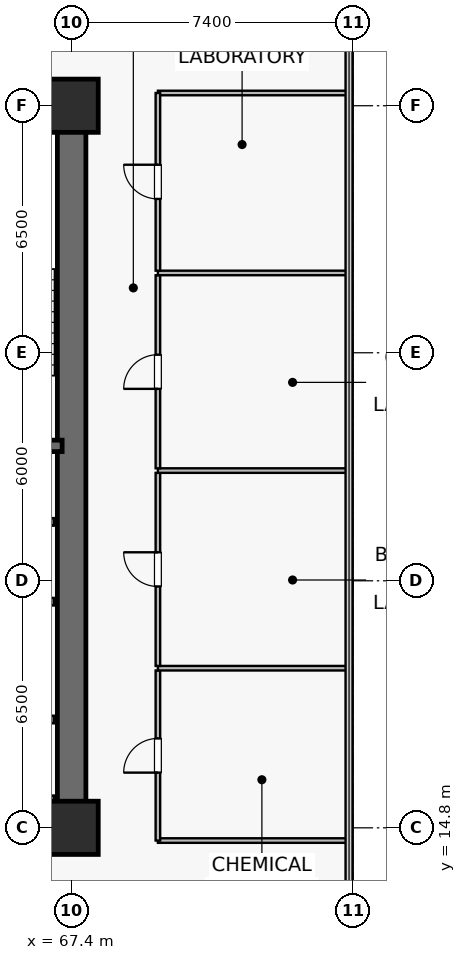
"""IFC4 building model, lengths in metres.
Left out: names, types, materials, properties, quantities, classifications, styles, units other than length and angle.
Written with IfcOpenShell. Run it as: python <this file> out.ifc"""

import sys

from ifc_helpers import new_model, si_unit, direction, frame, frame_2d, origin, origin_2d, place, context, subcontext, project, spatial, rectangle, extrude, source, transform, mapped, element, fill, save


model = new_model("IFC4")
c1 = context("Model", 3, precision=1e-05, world=origin(), true_north=direction((0.0, 1.0)))
c2 = subcontext(c1, "Body", "Model", "MODEL_VIEW")
j1 = project(units=[si_unit("LENGTHUNIT", "METRE"), si_unit("PLANEANGLEUNIT", "RADIAN")], contexts=[c1])
p1 = place(None, origin())
s1 = spatial("IfcSite", under=j1, at=p1, CompositionType="ELEMENT")
p2 = place(p1, origin())
s2 = spatial("IfcBuilding", under=s1, at=p2, CompositionType="ELEMENT")
p3 = place(p2, frame((0.0, 0.0, 58.0)))
s3 = spatial("IfcBuildingStorey", under=s2, at=p3, CompositionType="ELEMENT", Elevation=58.0)
p4 = place(p3, frame((52.225, 14.8, 0.0), z_axis=(0.0, 0.0, 1.0), x_axis=(1.0, 0.0, 0.0)))
e1 = element("IfcWall", 1, at=p4, inside=s3, PredefinedType="SHEAR", context=c2, shape_type="SweptSolid", body=[
    extrude(rectangle(XDim=15.55, YDim=0.75, at=frame_2d((7.775, 0.0))), origin(), (0.0, 0.0, 1.0), 3.78),
])
p5 = place(p3, frame((52.225, 33.8, 0.0), z_axis=(0.0, 0.0, 1.0), x_axis=(1.0, 0.0, 0.0)))
e2 = element("IfcWall", 2, at=p5, inside=s3, PredefinedType="SHEAR", context=c2, shape_type="SweptSolid", body=[
    extrude(rectangle(XDim=15.55, YDim=0.75, at=frame_2d((7.775, 0.0))), origin(), (0.0, 0.0, 1.0), 3.78),
])
p6 = place(p5, frame((7.725, 0.0, 0.0)))
e3 = element("IfcOpeningElement", 3, at=p6, cuts=e2, PredefinedType="OPENING", context=c2, shape_type="SweptSolid", body=[
    extrude(rectangle(XDim=0.95, YDim=2.15, at=frame_2d((0.475, 1.075))), frame((0.0, 0.385, 0.0), z_axis=(0.0, -1.0, 0.0), x_axis=(1.0, 0.0, 0.0)), (0.0, 0.0, 1.0), 0.77),
])
p7 = place(p5, frame((2.66, 0.0, 0.0)))
e4 = element("IfcOpeningElement", 4, at=p7, cuts=e2, PredefinedType="OPENING", context=c2, shape_type="SweptSolid", body=[
    extrude(rectangle(XDim=0.95, YDim=2.15, at=frame_2d((0.475, 1.075))), frame((0.0, 0.385, 0.0), z_axis=(0.0, -1.0, 0.0), x_axis=(1.0, 0.0, 0.0)), (0.0, 0.0, 1.0), 0.77),
])
p8 = place(p3, frame((67.4, 15.175, 0.0), z_axis=(0.0, 0.0, 1.0), x_axis=(0.0, 1.0, 0.0)))
e5 = element("IfcWall", 5, at=p8, inside=s3, PredefinedType="SHEAR", context=c2, shape_type="SweptSolid", body=[
    extrude(rectangle(XDim=18.25, YDim=0.75, at=frame_2d((9.125, 0.0))), origin(), (0.0, 0.0, 1.0), 3.78),
])
p9 = place(p3, frame((63.35, 24.85, 0.0), z_axis=(0.0, 0.0, 1.0), x_axis=(1.0, 0.0, 0.0)))
e6 = element("IfcWall", 6, at=p9, inside=s3, PredefinedType="SHEAR", context=c2, shape_type="SweptSolid", body=[
    extrude(rectangle(XDim=3.8, YDim=0.3, at=frame_2d((1.9, 0.0))), origin(), (0.0, 0.0, 1.0), 3.78),
])
p10 = place(p3, frame((63.35, 33.4, 0.0), z_axis=(0.0, 0.0, 1.0), x_axis=(1.0, 0.0, 0.0)))
e7 = element("IfcWall", 7, at=p10, inside=s3, PredefinedType="SOLIDWALL", context=c2, shape_type="SweptSolid", body=[
    extrude(rectangle(XDim=3.72, YDim=0.12, at=frame_2d((1.86, 0.0))), origin(), (0.0, 0.0, 1.0), 3.78),
])
m1 = source(origin(), c2, "Body", "SweptSolid", [
    extrude(rectangle(XDim=1.4, YDim=1.4, at=origin_2d()), origin(), (0.0, 0.0, 1.0), 4.1),
])
for number, where, z_axis, x_axis in (
    (8, (67.4, 14.8, 0.0), (0.0, 0.0, 1.0), (1.0, 0.0, 0.0)),
    (9, (67.4, 33.8, 0.0), (0.0, 0.0, 1.0), (1.0, 0.0, 0.0)),
):
    element("IfcColumn", number, at=place(p3, frame(where, z_axis=z_axis, x_axis=x_axis)), inside=s3, PredefinedType="COLUMN", context=c2, shape_type="MappedRepresentation", body=[
        mapped(m1, transform((0.0, 0.0, 0.0), scale=1.0)),
    ])
p11 = place(p3, frame((64.67, 17.65, 0.0), z_axis=(0.0, 0.0, 1.0), x_axis=(1.0, 0.0, 0.0)))
e10 = element("IfcWall", 10, at=p11, inside=s3, PredefinedType="SOLIDWALL", context=c2, shape_type="SweptSolid", body=[
    extrude(rectangle(XDim=2.26, YDim=0.2, at=frame_2d((1.13, 0.0))), origin(), (0.0, 0.0, 1.0), 3.78),
])
p12 = place(p11, frame((0.58, 0.0, 0.0)))
e11 = element("IfcOpeningElement", 11, at=p12, cuts=e10, PredefinedType="OPENING", context=c2, shape_type="SweptSolid", body=[
    extrude(rectangle(XDim=1.1, YDim=2.22, at=frame_2d((0.55, 1.11))), frame((0.0, 0.11, 0.0), z_axis=(0.0, -1.0, 0.0), x_axis=(1.0, 0.0, 0.0)), (0.0, 0.0, 1.0), 0.22),
])
for number, where, z_axis, x_axis in (
    (12, (64.67, 15.55, 0.0), (0.0, 0.0, 1.0), (1.0, 0.0, 0.0)),
    (13, (64.67, 20.75, 0.0), (0.0, 0.0, 1.0), (1.0, 0.0, 0.0)),
    (14, (64.67, 22.85, 0.0), (0.0, 0.0, 1.0), (1.0, 0.0, 0.0)),
):
    element("IfcWall", number, at=place(p3, frame(where, z_axis=z_axis, x_axis=x_axis)), inside=s3, PredefinedType="SOLIDWALL", context=c2, shape_type="SweptSolid", body=[
        extrude(rectangle(XDim=2.26, YDim=0.2, at=frame_2d((1.13, 0.0))), origin(), (0.0, 0.0, 1.0), 3.78),
    ])
for number, where, z_axis, x_axis in (
    (15, (69.67, 14.465, 0.0), (0.0, 0.0, 1.0), (1.0, 0.0, 0.0)),
    (16, (69.67, 34.135, 0.0), (0.0, 0.0, 1.0), (1.0, 0.0, 0.0)),
):
    element("IfcWall", number, at=place(p3, frame(where, z_axis=z_axis, x_axis=x_axis)), inside=s3, PredefinedType="PARTITIONING", context=c2, shape_type="SweptSolid", body=[
        extrude(rectangle(XDim=5.02, YDim=0.12, at=frame_2d((2.51, 0.0))), origin(), (0.0, 0.0, 1.0), 3.78),
    ])
p13 = place(p3, frame((69.67, 14.465, 0.0), z_axis=(0.0, 0.0, 1.0), x_axis=(0.0, 1.0, 0.0)))
e17 = element("IfcWall", 17, at=p13, inside=s3, PredefinedType="PARTITIONING", context=c2, shape_type="SweptSolid", body=[
    extrude(rectangle(XDim=4.475, YDim=0.12, at=frame_2d((2.237, 0.0))), origin(), (0.0, 0.0, 1.0), 3.78),
])
p14 = place(p13, frame((1.788, 0.0, 0.0)))
e18 = element("IfcOpeningElement", 18, at=p14, cuts=e17, PredefinedType="OPENING", context=c2, shape_type="SweptSolid", body=[
    extrude(rectangle(XDim=0.9, YDim=2.1, at=frame_2d((0.45, 1.05))), frame((0.0, 0.07, 0.0), z_axis=(0.0, -1.0, 0.0), x_axis=(1.0, 0.0, 0.0)), (0.0, 0.0, 1.0), 0.14),
])
p15 = place(p3, frame((69.67, 19.0, 0.0), z_axis=(0.0, 0.0, 1.0), x_axis=(1.0, 0.0, 0.0)))
e19 = element("IfcWall", 19, at=p15, inside=s3, PredefinedType="PARTITIONING", context=c2, shape_type="SweptSolid", body=[
    extrude(rectangle(XDim=5.02, YDim=0.12, at=frame_2d((2.51, 0.0))), origin(), (0.0, 0.0, 1.0), 3.78),
])
p16 = place(p3, frame((69.67, 19.06, 0.0), z_axis=(0.0, 0.0, 1.0), x_axis=(0.0, 1.0, 0.0)))
e20 = element("IfcWall", 20, at=p16, inside=s3, PredefinedType="PARTITIONING", context=c2, shape_type="SweptSolid", body=[
    extrude(rectangle(XDim=5.08, YDim=0.12, at=frame_2d((2.54, 0.0))), origin(), (0.0, 0.0, 1.0), 3.78),
])
p17 = place(p16, frame((2.09, 0.0, 0.0)))
e21 = element("IfcOpeningElement", 21, at=p17, cuts=e20, PredefinedType="OPENING", context=c2, shape_type="SweptSolid", body=[
    extrude(rectangle(XDim=0.9, YDim=2.1, at=frame_2d((0.45, 1.05))), frame((0.0, 0.07, 0.0), z_axis=(0.0, -1.0, 0.0), x_axis=(1.0, 0.0, 0.0)), (0.0, 0.0, 1.0), 0.14),
])
p18 = place(p3, frame((69.67, 24.2, 0.0), z_axis=(0.0, 0.0, 1.0), x_axis=(1.0, 0.0, 0.0)))
e22 = element("IfcWall", 22, at=p18, inside=s3, PredefinedType="PARTITIONING", context=c2, shape_type="SweptSolid", body=[
    extrude(rectangle(XDim=5.02, YDim=0.12, at=frame_2d((2.51, 0.0))), origin(), (0.0, 0.0, 1.0), 3.78),
])
p19 = place(p3, frame((69.67, 24.26, 0.0), z_axis=(0.0, 0.0, 1.0), x_axis=(0.0, 1.0, 0.0)))
e23 = element("IfcWall", 23, at=p19, inside=s3, PredefinedType="PARTITIONING", context=c2, shape_type="SweptSolid", body=[
    extrude(rectangle(XDim=5.08, YDim=0.12, at=frame_2d((2.54, 0.0))), origin(), (0.0, 0.0, 1.0), 3.78),
])
p20 = place(p19, frame((2.09, 0.0, 0.0)))
e24 = element("IfcOpeningElement", 24, at=p20, cuts=e23, PredefinedType="OPENING", context=c2, shape_type="SweptSolid", body=[
    extrude(rectangle(XDim=0.9, YDim=2.1, at=frame_2d((0.45, 1.05))), frame((0.0, 0.07, 0.0), z_axis=(0.0, -1.0, 0.0), x_axis=(1.0, 0.0, 0.0)), (0.0, 0.0, 1.0), 0.14),
])
p21 = place(p3, frame((69.67, 29.4, 0.0), z_axis=(0.0, 0.0, 1.0), x_axis=(1.0, 0.0, 0.0)))
e25 = element("IfcWall", 25, at=p21, inside=s3, PredefinedType="PARTITIONING", context=c2, shape_type="SweptSolid", body=[
    extrude(rectangle(XDim=5.02, YDim=0.12, at=frame_2d((2.51, 0.0))), origin(), (0.0, 0.0, 1.0), 3.78),
])
p22 = place(p3, frame((69.67, 29.46, 0.0), z_axis=(0.0, 0.0, 1.0), x_axis=(0.0, 1.0, 0.0)))
e26 = element("IfcWall", 26, at=p22, inside=s3, PredefinedType="PARTITIONING", context=c2, shape_type="SweptSolid", body=[
    extrude(rectangle(XDim=4.675, YDim=0.12, at=frame_2d((2.337, 0.0))), origin(), (0.0, 0.0, 1.0), 3.78),
])
p23 = place(p22, frame((1.887, 0.0, 0.0)))
e27 = element("IfcOpeningElement", 27, at=p23, cuts=e26, PredefinedType="OPENING", context=c2, shape_type="SweptSolid", body=[
    extrude(rectangle(XDim=0.9, YDim=2.1, at=frame_2d((0.45, 1.05))), frame((0.0, 0.07, 0.0), z_axis=(0.0, -1.0, 0.0), x_axis=(1.0, 0.0, 0.0)), (0.0, 0.0, 1.0), 0.14),
])
m2 = source(origin(), c2, "Body", "SweptSolid", [
    extrude(rectangle(XDim=0.9, YDim=2.1, at=frame_2d((0.45, 1.05))), frame((0.0, 0.025, 0.0), z_axis=(0.0, -1.0, 0.0), x_axis=(1.0, 0.0, 0.0)), (0.0, 0.0, 1.0), 0.05),
])
p24 = place(p14, origin())
e28 = element("IfcDoor", 28, at=p24, inside=s3, OperationType="SINGLE_SWING_LEFT", PredefinedType="DOOR", context=c2, shape_type="MappedRepresentation", body=[
    mapped(m2, transform((0.0, 0.0, 0.0), scale=1.0)),
])
fill(e18, e28)
p25 = place(p17, origin())
e29 = element("IfcDoor", 29, at=p25, inside=s3, OperationType="SINGLE_SWING_RIGHT", PredefinedType="DOOR", context=c2, shape_type="MappedRepresentation", body=[
    mapped(m2, transform((0.0, 0.0, 0.0), scale=1.0)),
])
fill(e21, e29)
p26 = place(p20, origin())
e30 = element("IfcDoor", 30, at=p26, inside=s3, OperationType="SINGLE_SWING_LEFT", PredefinedType="DOOR", context=c2, shape_type="MappedRepresentation", body=[
    mapped(m2, transform((0.0, 0.0, 0.0), scale=1.0)),
])
fill(e24, e30)
p27 = place(p23, origin())
e31 = element("IfcDoor", 31, at=p27, inside=s3, OperationType="SINGLE_SWING_RIGHT", PredefinedType="DOOR", context=c2, shape_type="MappedRepresentation", body=[
    mapped(m2, transform((0.0, 0.0, 0.0), scale=1.0)),
])
fill(e27, e31)
save(model, sys.argv[1])
